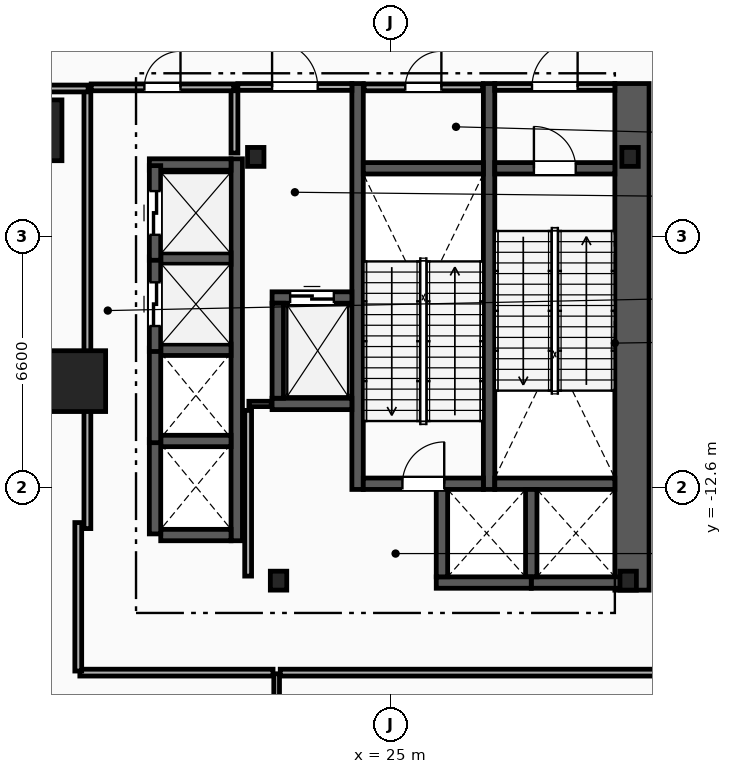
"""IFC4 building model, lengths in metres.
Left out: names, types, materials, properties, quantities, classifications, styles, units other than length and angle.
Written with IfcOpenShell. Run it as: python <this file> out.ifc"""

import sys

from ifc_helpers import new_model, si_unit, direction, frame, frame_2d, origin, origin_2d, place, context, subcontext, project, spatial, rectangle, i_section, extrude, element, fill, save


model = new_model("IFC4")
c1 = context("Model", 3, precision=1e-05, world=origin(), true_north=direction((0.0, 1.0)))
c2 = subcontext(c1, "Body", "Model", "MODEL_VIEW")
j1 = project(units=[si_unit("LENGTHUNIT", "METRE"), si_unit("PLANEANGLEUNIT", "RADIAN")], contexts=[c1])
p1 = place(None, origin())
s1 = spatial("IfcSite", under=j1, at=p1, CompositionType="ELEMENT")
p2 = place(p1, origin())
s2 = spatial("IfcBuilding", under=s1, at=p2, CompositionType="ELEMENT")
p3 = place(p2, frame((0.0, 0.0, 6.0)))
s3 = spatial("IfcBuildingStorey", under=s2, at=p3, CompositionType="ELEMENT", Elevation=6.0)
for number, where, z_axis, x_axis in (
    (1, (31.3, -3.9, 0.0), (0.0, 0.0, 1.0), (1.0, 0.0, 0.0)),
    (2, (21.45, -3.9, 0.0), (0.0, 0.0, 1.0), (1.0, 0.0, 0.0)),
    (3, (22.05, -15.05, 0.0), (0.0, 0.0, 1.0), (1.0, 0.0, 0.0)),
    (4, (31.25, -15.05, 0.0), (0.0, 0.0, 1.0), (1.0, 0.0, 0.0)),
):
    element("IfcColumn", number, at=place(p3, frame(where, z_axis=z_axis, x_axis=x_axis)), inside=s3, PredefinedType="COLUMN", context=c2, shape_type="SweptSolid", body=[
        extrude(i_section(OverallWidth=0.432, OverallDepth=0.498, WebThickness=0.056, FlangeThickness=0.089, FilletRadius=0.018, at=origin_2d()), origin(), (0.0, 0.0, 1.0), 6.0),
    ])
for number, where, z_axis, x_axis in (
    (5, (15.55, -3.2, 0.0), (0.0, 0.0, 1.0), (1.0, 0.0, 0.0)),
    (6, (16.7, -9.8, 0.0), (0.0, 0.0, 1.0), (1.0, 0.0, 0.0)),
):
    element("IfcColumn", number, at=place(p3, frame(where, z_axis=z_axis, x_axis=x_axis)), inside=s3, PredefinedType="COLUMN", context=c2, shape_type="SweptSolid", body=[
        extrude(rectangle(XDim=1.6, YDim=1.6, at=origin_2d()), origin(), (0.0, 0.0, 1.0), 6.0),
    ])
p4 = place(p3, frame((31.35, -15.3, 0.0), z_axis=(0.0, 0.0, 1.0), x_axis=(0.0, 1.0, 0.0)))
e7 = element("IfcWall", 7, at=p4, inside=s3, PredefinedType="SHEAR", context=c2, shape_type="SweptSolid", body=[
    extrude(rectangle(XDim=13.33, YDim=0.9, at=frame_2d((6.665, 0.0))), origin(), (0.0, 0.0, 1.0), 5.65),
])
for number, where, z_axis, x_axis in (
    (8, (27.59, -12.65, 0.0), (0.0, 0.0, 1.0), (0.0, 1.0, 0.0)),
    (9, (24.13, -12.65, 0.0), (0.0, 0.0, 1.0), (0.0, 1.0, 0.0)),
):
    element("IfcWall", number, at=place(p3, frame(where, z_axis=z_axis, x_axis=x_axis)), inside=s3, PredefinedType="SHEAR", context=c2, shape_type="SweptSolid", body=[
        extrude(rectangle(XDim=10.68, YDim=0.3, at=frame_2d((5.34, 0.0))), origin(), (0.0, 0.0, 1.0), 5.65),
    ])
p5 = place(p3, frame((27.74, -4.2, 0.0), z_axis=(0.0, 0.0, 1.0), x_axis=(1.0, 0.0, 0.0)))
e10 = element("IfcWall", 10, at=p5, inside=s3, PredefinedType="SHEAR", context=c2, shape_type="SweptSolid", body=[
    extrude(rectangle(XDim=3.16, YDim=0.3, at=frame_2d((1.58, 0.0))), origin(), (0.0, 0.0, 1.0), 5.65),
])
p6 = place(p5, frame((1.03, 0.0, 0.0)))
e11 = element("IfcOpeningElement", 11, at=p6, cuts=e10, PredefinedType="OPENING", context=c2, shape_type="SweptSolid", body=[
    extrude(rectangle(XDim=1.1, YDim=2.15, at=frame_2d((0.55, 1.075))), frame((0.0, 0.16, 0.0), z_axis=(0.0, -1.0, 0.0), x_axis=(1.0, 0.0, 0.0)), (0.0, 0.0, 1.0), 0.32),
])
p7 = place(p3, frame((27.74, -12.5, 0.0), z_axis=(0.0, 0.0, 1.0), x_axis=(1.0, 0.0, 0.0)))
e12 = element("IfcWall", 12, at=p7, inside=s3, PredefinedType="SHEAR", context=c2, shape_type="SweptSolid", body=[
    extrude(rectangle(XDim=3.16, YDim=0.3, at=frame_2d((1.58, 0.0))), origin(), (0.0, 0.0, 1.0), 5.65),
])
p8 = place(p3, frame((24.28, -12.5, 0.0), z_axis=(0.0, 0.0, 1.0), x_axis=(1.0, 0.0, 0.0)))
e13 = element("IfcWall", 13, at=p8, inside=s3, PredefinedType="SHEAR", context=c2, shape_type="SweptSolid", body=[
    extrude(rectangle(XDim=3.16, YDim=0.3, at=frame_2d((1.58, 0.0))), origin(), (0.0, 0.0, 1.0), 5.65),
])
p9 = place(p8, frame((1.03, 0.0, 0.0)))
e14 = element("IfcOpeningElement", 14, at=p9, cuts=e13, PredefinedType="OPENING", context=c2, shape_type="SweptSolid", body=[
    extrude(rectangle(XDim=1.1, YDim=2.15, at=frame_2d((0.55, 1.075))), frame((0.0, 0.16, 0.0), z_axis=(0.0, -1.0, 0.0), x_axis=(1.0, 0.0, 0.0)), (0.0, 0.0, 1.0), 0.32),
])
p10 = place(p3, frame((24.28, -4.2, 0.0), z_axis=(0.0, 0.0, 1.0), x_axis=(1.0, 0.0, 0.0)))
e15 = element("IfcWall", 15, at=p10, inside=s3, PredefinedType="SHEAR", context=c2, shape_type="SweptSolid", body=[
    extrude(rectangle(XDim=3.16, YDim=0.3, at=frame_2d((1.58, 0.0))), origin(), (0.0, 0.0, 1.0), 5.65),
])
p11 = place(p3, frame((20.89, -3.8, 0.0), z_axis=(0.0, 0.0, 1.0), x_axis=(0.0, 1.0, 0.0)))
e16 = element("IfcWall", 16, at=p11, inside=s3, PredefinedType="PARTITIONING", context=c2, shape_type="SweptSolid", body=[
    extrude(rectangle(XDim=1.65, YDim=0.18, at=frame_2d((0.825, 0.0))), origin(), (0.0, 0.0, 1.0), 5.65),
])
p12 = place(p3, frame((20.98, -2.06, 0.0), z_axis=(0.0, 0.0, 1.0), x_axis=(1.0, 0.0, 0.0)))
e17 = element("IfcWall", 17, at=p12, inside=s3, PredefinedType="PARTITIONING", context=c2, shape_type="SweptSolid", body=[
    extrude(rectangle(XDim=3.0, YDim=0.18, at=frame_2d((1.5, 0.0))), origin(), (0.0, 0.0, 1.0), 5.65),
])
p13 = place(p12, frame((0.9, 0.0, 0.0)))
e18 = element("IfcOpeningElement", 18, at=p13, cuts=e17, PredefinedType="OPENING", context=c2, shape_type="SweptSolid", body=[
    extrude(rectangle(XDim=1.2, YDim=2.15, at=frame_2d((0.6, 1.075))), frame((0.0, 0.1, 0.0), z_axis=(0.0, -1.0, 0.0), x_axis=(1.0, 0.0, 0.0)), (0.0, 0.0, 1.0), 0.2),
])
p14 = place(p3, frame((27.74, -2.06, 0.0), z_axis=(0.0, 0.0, 1.0), x_axis=(1.0, 0.0, 0.0)))
e19 = element("IfcWall", 19, at=p14, inside=s3, PredefinedType="PARTITIONING", context=c2, shape_type="SweptSolid", body=[
    extrude(rectangle(XDim=3.16, YDim=0.18, at=frame_2d((1.58, 0.0))), origin(), (0.0, 0.0, 1.0), 5.65),
])
p15 = place(p14, frame((0.98, 0.0, 0.0)))
e20 = element("IfcOpeningElement", 20, at=p15, cuts=e19, PredefinedType="OPENING", context=c2, shape_type="SweptSolid", body=[
    extrude(rectangle(XDim=1.2, YDim=2.15, at=frame_2d((0.6, 1.075))), frame((0.0, 0.1, 0.0), z_axis=(0.0, -1.0, 0.0), x_axis=(1.0, 0.0, 0.0)), (0.0, 0.0, 1.0), 0.2),
])
p16 = place(p3, frame((21.88, -7.6, 0.0), z_axis=(0.0, 0.0, 1.0), x_axis=(1.0, 0.0, 0.0)))
e21 = element("IfcWall", 21, at=p16, inside=s3, PredefinedType="SHEAR", context=c2, shape_type="SweptSolid", body=[
    extrude(rectangle(XDim=2.1, YDim=0.3, at=frame_2d((1.05, 0.0))), origin(), (0.0, 0.0, 1.0), 5.65),
])
p17 = place(p16, frame((0.475, 0.0, 0.0)))
e22 = element("IfcOpeningElement", 22, at=p17, cuts=e21, PredefinedType="OPENING", context=c2, shape_type="SweptSolid", body=[
    extrude(rectangle(XDim=1.15, YDim=2.2, at=frame_2d((0.575, 1.1))), frame((0.0, 0.16, 0.0), z_axis=(0.0, -1.0, 0.0), x_axis=(1.0, 0.0, 0.0)), (0.0, 0.0, 1.0), 0.32),
])
p18 = place(p3, frame((21.88, -10.4, 0.0), z_axis=(0.0, 0.0, 1.0), x_axis=(1.0, 0.0, 0.0)))
e23 = element("IfcWall", 23, at=p18, inside=s3, PredefinedType="SHEAR", context=c2, shape_type="SweptSolid", body=[
    extrude(rectangle(XDim=2.1, YDim=0.3, at=frame_2d((1.05, 0.0))), origin(), (0.0, 0.0, 1.0), 5.65),
])
for number, where, z_axis, x_axis in (
    (24, (22.03, -10.25, 0.0), (0.0, 0.0, 1.0), (0.0, 1.0, 0.0)),
    (25, (28.7, -15.1, 0.0), (0.0, 0.0, 1.0), (1.0, 0.0, 0.0)),
):
    element("IfcWall", number, at=place(p3, frame(where, z_axis=z_axis, x_axis=x_axis)), inside=s3, PredefinedType="SHEAR", context=c2, shape_type="SweptSolid", body=[
        extrude(rectangle(XDim=2.5, YDim=0.3, at=frame_2d((1.25, 0.0))), origin(), (0.0, 0.0, 1.0), 5.65),
    ])
p19 = place(p3, frame((28.7, -14.95, 0.0), z_axis=(0.0, 0.0, 1.0), x_axis=(0.0, 1.0, 0.0)))
e26 = element("IfcWall", 26, at=p19, inside=s3, PredefinedType="SHEAR", context=c2, shape_type="SweptSolid", body=[
    extrude(rectangle(XDim=2.3, YDim=0.3, at=frame_2d((1.15, 0.0))), origin(), (0.0, 0.0, 1.0), 5.65),
])
p20 = place(p3, frame((26.2, -15.1, 0.0), z_axis=(0.0, 0.0, 1.0), x_axis=(1.0, 0.0, 0.0)))
e27 = element("IfcWall", 27, at=p20, inside=s3, PredefinedType="SHEAR", context=c2, shape_type="SweptSolid", body=[
    extrude(rectangle(XDim=2.5, YDim=0.3, at=frame_2d((1.25, 0.0))), origin(), (0.0, 0.0, 1.0), 5.65),
])
p21 = place(p3, frame((26.35, -14.95, 0.0), z_axis=(0.0, 0.0, 1.0), x_axis=(0.0, 1.0, 0.0)))
e28 = element("IfcWall", 28, at=p21, inside=s3, PredefinedType="SHEAR", context=c2, shape_type="SweptSolid", body=[
    extrude(rectangle(XDim=2.3, YDim=0.3, at=frame_2d((1.15, 0.0))), origin(), (0.0, 0.0, 1.0), 5.65),
])
p22 = place(p3, frame((20.95, -14.0, 0.0), z_axis=(0.0, 0.0, 1.0), x_axis=(0.0, 1.0, 0.0)))
e29 = element("IfcWall", 29, at=p22, inside=s3, PredefinedType="SHEAR", context=c2, shape_type="SweptSolid", body=[
    extrude(rectangle(XDim=10.05, YDim=0.3, at=frame_2d((5.025, 0.0))), origin(), (0.0, 0.0, 1.0), 5.65),
])
p23 = place(p3, frame((18.95, -13.85, 0.0), z_axis=(0.0, 0.0, 1.0), x_axis=(1.0, 0.0, 0.0)))
e30 = element("IfcWall", 30, at=p23, inside=s3, PredefinedType="SHEAR", context=c2, shape_type="SweptSolid", body=[
    extrude(rectangle(XDim=1.85, YDim=0.3, at=frame_2d((0.925, 0.0))), origin(), (0.0, 0.0, 1.0), 5.65),
])
p24 = place(p3, frame((18.65, -4.1, 0.0), z_axis=(0.0, 0.0, 1.0), x_axis=(1.0, 0.0, 0.0)))
e31 = element("IfcWall", 31, at=p24, inside=s3, PredefinedType="SHEAR", context=c2, shape_type="SweptSolid", body=[
    extrude(rectangle(XDim=2.15, YDim=0.3, at=frame_2d((1.075, 0.0))), origin(), (0.0, 0.0, 1.0), 5.65),
])
for number, where, z_axis, x_axis in (
    (32, (18.95, -11.375, 0.0), (0.0, 0.0, 1.0), (1.0, 0.0, 0.0)),
    (33, (18.95, -8.975, 0.0), (0.0, 0.0, 1.0), (1.0, 0.0, 0.0)),
    (34, (18.95, -6.575, 0.0), (0.0, 0.0, 1.0), (1.0, 0.0, 0.0)),
):
    element("IfcWall", number, at=place(p3, frame(where, z_axis=z_axis, x_axis=x_axis)), inside=s3, PredefinedType="SHEAR", context=c2, shape_type="SweptSolid", body=[
        extrude(rectangle(XDim=1.85, YDim=0.3, at=frame_2d((0.925, 0.0))), origin(), (0.0, 0.0, 1.0), 5.65),
    ])
for number, where, z_axis, x_axis in (
    (35, (18.8, -13.82, 0.0), (0.0, 0.0, 1.0), (0.0, 1.0, 0.0)),
    (36, (18.8, -11.42, 0.0), (0.0, 0.0, 1.0), (0.0, 1.0, 0.0)),
):
    element("IfcWall", number, at=place(p3, frame(where, z_axis=z_axis, x_axis=x_axis)), inside=s3, PredefinedType="SHEAR", context=c2, shape_type="SweptSolid", body=[
        extrude(rectangle(XDim=2.49, YDim=0.3, at=frame_2d((1.245, 0.0))), origin(), (0.0, 0.0, 1.0), 5.65),
    ])
p25 = place(p3, frame((18.8, -9.02, 0.0), z_axis=(0.0, 0.0, 1.0), x_axis=(0.0, 1.0, 0.0)))
e37 = element("IfcWall", 37, at=p25, inside=s3, PredefinedType="SHEAR", context=c2, shape_type="SweptSolid", body=[
    extrude(rectangle(XDim=2.49, YDim=0.3, at=frame_2d((1.245, 0.0))), origin(), (0.0, 0.0, 1.0), 5.65),
])
p26 = place(p25, frame((0.67, 0.0, 0.0)))
e38 = element("IfcOpeningElement", 38, at=p26, cuts=e37, PredefinedType="OPENING", context=c2, shape_type="SweptSolid", body=[
    extrude(rectangle(XDim=1.15, YDim=2.2, at=frame_2d((0.575, 1.1))), frame((0.0, 0.16, 0.0), z_axis=(0.0, -1.0, 0.0), x_axis=(1.0, 0.0, 0.0)), (0.0, 0.0, 1.0), 0.32),
])
p27 = place(p3, frame((18.8, -6.62, 0.0), z_axis=(0.0, 0.0, 1.0), x_axis=(0.0, 1.0, 0.0)))
e39 = element("IfcWall", 39, at=p27, inside=s3, PredefinedType="SHEAR", context=c2, shape_type="SweptSolid", body=[
    extrude(rectangle(XDim=2.49, YDim=0.3, at=frame_2d((1.245, 0.0))), origin(), (0.0, 0.0, 1.0), 5.65),
])
p28 = place(p27, frame((0.67, 0.0, 0.0)))
e40 = element("IfcOpeningElement", 40, at=p28, cuts=e39, PredefinedType="OPENING", context=c2, shape_type="SweptSolid", body=[
    extrude(rectangle(XDim=1.15, YDim=2.2, at=frame_2d((0.575, 1.1))), frame((0.0, 0.16, 0.0), z_axis=(0.0, -1.0, 0.0), x_axis=(1.0, 0.0, 0.0)), (0.0, 0.0, 1.0), 0.32),
])
p29 = place(p3, frame((17.02, -13.68, 0.0), z_axis=(0.0, 0.0, 1.0), x_axis=(0.0, 1.0, 0.0)))
e41 = element("IfcWall", 41, at=p29, inside=s3, PredefinedType="PARTITIONING", context=c2, shape_type="SweptSolid", body=[
    extrude(rectangle(XDim=11.51, YDim=0.18, at=frame_2d((5.755, 0.0))), origin(), (0.0, 0.0, 1.0), 5.65),
])
p30 = place(p3, frame((17.12, -2.07, 0.0), z_axis=(0.0, 0.0, 1.0), x_axis=(1.0, 0.0, 0.0)))
e42 = element("IfcWall", 42, at=p30, inside=s3, PredefinedType="PARTITIONING", context=c2, shape_type="SweptSolid", body=[
    extrude(rectangle(XDim=3.75, YDim=0.18, at=frame_2d((1.875, 0.0))), origin(), (0.0, 0.0, 1.0), 5.65),
])
p31 = place(p30, frame((1.4, 0.0, 0.0)))
e43 = element("IfcOpeningElement", 43, at=p31, cuts=e42, PredefinedType="OPENING", context=c2, shape_type="SweptSolid", body=[
    extrude(rectangle(XDim=0.95, YDim=2.1, at=frame_2d((0.475, 1.05))), frame((0.0, 0.1, 0.0), z_axis=(0.0, -1.0, 0.0), x_axis=(1.0, 0.0, 0.0)), (0.0, 0.0, 1.0), 0.2),
])
p32 = place(p3, frame((21.27, -10.4, 0.0), z_axis=(0.0, 0.0, 1.0), x_axis=(1.0, 0.0, 0.0)))
e44 = element("IfcWall", 44, at=p32, inside=s3, PredefinedType="PARTITIONING", context=c2, shape_type="SweptSolid", body=[
    extrude(rectangle(XDim=0.59, YDim=0.14, at=frame_2d((0.295, 0.0))), origin(), (0.0, 0.0, 1.0), 5.65),
])
p33 = place(p3, frame((21.25, -14.93, 0.0), z_axis=(0.0, 0.0, 1.0), x_axis=(0.0, 1.0, 0.0)))
e45 = element("IfcWall", 45, at=p33, inside=s3, PredefinedType="PARTITIONING", context=c2, shape_type="SweptSolid", body=[
    extrude(rectangle(XDim=4.36, YDim=0.18, at=frame_2d((2.18, 0.0))), origin(), (0.0, 0.0, 1.0), 5.65),
])
p34 = place(p3, frame((24.3, -2.07, 0.0), z_axis=(0.0, 0.0, 1.0), x_axis=(1.0, 0.0, 0.0)))
e46 = element("IfcWall", 46, at=p34, inside=s3, PredefinedType="PARTITIONING", context=c2, shape_type="SweptSolid", body=[
    extrude(rectangle(XDim=3.12, YDim=0.18, at=frame_2d((1.56, 0.0))), origin(), (0.0, 0.0, 1.0), 5.65),
])
p35 = place(p34, frame((1.085, 0.0, 0.0)))
e47 = element("IfcOpeningElement", 47, at=p35, cuts=e46, PredefinedType="OPENING", context=c2, shape_type="SweptSolid", body=[
    extrude(rectangle(XDim=0.95, YDim=2.1, at=frame_2d((0.475, 1.05))), frame((0.0, 0.1, 0.0), z_axis=(0.0, -1.0, 0.0), x_axis=(1.0, 0.0, 0.0)), (0.0, 0.0, 1.0), 0.2),
])
p36 = place(p3, frame((22.0, -27.88, 0.0), z_axis=(0.0, 0.0, 1.0), x_axis=(0.0, 1.0, 0.0)))
e48 = element("IfcWall", 48, at=p36, inside=s3, PredefinedType="PARTITIONING", context=c2, shape_type="SweptSolid", body=[
    extrude(rectangle(XDim=10.38, YDim=0.15, at=frame_2d((5.19, 0.0))), origin(), (0.0, 0.0, 1.0), 5.65),
])
p37 = place(p36, frame((4.49, 0.0, 1.05)))
e49 = element("IfcOpeningElement", 49, at=p37, cuts=e48, PredefinedType="OPENING", context=c2, shape_type="SweptSolid", body=[
    extrude(rectangle(XDim=1.4, YDim=1.5, at=frame_2d((0.7, 0.75))), frame((0.0, 0.085, 0.0), z_axis=(0.0, -1.0, 0.0), x_axis=(1.0, 0.0, 0.0)), (0.0, 0.0, 1.0), 0.17),
])
p38 = place(p3, frame((10.3, -2.1, 0.0), z_axis=(0.0, 0.0, 1.0), x_axis=(1.0, 0.0, 0.0)))
e50 = element("IfcWall", 50, at=p38, inside=s3, PredefinedType="PARTITIONING", context=c2, shape_type="SweptSolid", body=[
    extrude(rectangle(XDim=6.74, YDim=0.18, at=frame_2d((3.37, 0.0))), origin(), (0.0, 0.0, 1.0), 4.877),
])
p39 = place(p3, frame((16.822, -17.47, 0.0), z_axis=(0.0, 0.0, 1.0), x_axis=(1.0, 0.0, 0.0)))
e51 = element("IfcWall", 51, at=p39, inside=s3, PredefinedType="PARTITIONING", context=c2, shape_type="SweptSolid", body=[
    extrude(rectangle(XDim=5.083, YDim=0.18, at=frame_2d((2.542, 0.0))), origin(), (0.0, 0.0, 1.0), 5.65),
])
p40 = place(p3, frame((16.78, -13.521, 0.0), z_axis=(0.0, 0.0, 1.0), x_axis=(0.0, -1.0, 0.0)))
e52 = element("IfcWall", 52, at=p40, inside=s3, PredefinedType="PARTITIONING", context=c2, shape_type="SweptSolid", body=[
    extrude(rectangle(XDim=3.907, YDim=0.18, at=frame_2d((1.954, 0.0))), origin(), (0.0, 0.0, 1.0), 5.65),
])
p41 = place(p3, frame((22.095, -17.47, 0.0), z_axis=(0.0, 0.0, 1.0), x_axis=(1.0, 0.0, 0.0)))
e53 = element("IfcWall", 53, at=p41, inside=s3, PredefinedType="PARTITIONING", context=c2, shape_type="SweptSolid", body=[
    extrude(rectangle(XDim=11.533, YDim=0.18, at=frame_2d((5.767, 0.0))), origin(), (0.0, 0.0, 1.0), 4.877),
])
p42 = place(p6, origin())
e54 = element("IfcDoor", 54, at=p42, inside=s3, OperationType="SINGLE_SWING_LEFT", PredefinedType="DOOR", context=c2, shape_type="SweptSolid", body=[
    extrude(rectangle(XDim=1.1, YDim=2.15, at=frame_2d((0.55, 1.075))), frame((0.0, 0.025, 0.0), z_axis=(0.0, -1.0, 0.0), x_axis=(1.0, 0.0, 0.0)), (0.0, 0.0, 1.0), 0.05),
])
fill(e11, e54)
p43 = place(p9, origin())
e55 = element("IfcDoor", 55, at=p43, inside=s3, OperationType="SINGLE_SWING_RIGHT", PredefinedType="DOOR", context=c2, shape_type="SweptSolid", body=[
    extrude(rectangle(XDim=1.1, YDim=2.15, at=frame_2d((0.55, 1.075))), frame((0.0, 0.025, 0.0), z_axis=(0.0, -1.0, 0.0), x_axis=(1.0, 0.0, 0.0)), (0.0, 0.0, 1.0), 0.05),
])
fill(e14, e55)
p44 = place(p13, origin())
e56 = element("IfcDoor", 56, at=p44, inside=s3, OperationType="SINGLE_SWING_LEFT", PredefinedType="DOOR", context=c2, shape_type="SweptSolid", body=[
    extrude(rectangle(XDim=1.2, YDim=2.15, at=frame_2d((0.6, 1.075))), frame((0.0, 0.025, 0.0), z_axis=(0.0, -1.0, 0.0), x_axis=(1.0, 0.0, 0.0)), (0.0, 0.0, 1.0), 0.05),
])
fill(e18, e56)
p45 = place(p15, origin())
e57 = element("IfcDoor", 57, at=p45, inside=s3, OperationType="SINGLE_SWING_RIGHT", PredefinedType="DOOR", context=c2, shape_type="SweptSolid", body=[
    extrude(rectangle(XDim=1.2, YDim=2.15, at=frame_2d((0.6, 1.075))), frame((0.0, 0.025, 0.0), z_axis=(0.0, -1.0, 0.0), x_axis=(1.0, 0.0, 0.0)), (0.0, 0.0, 1.0), 0.05),
])
fill(e20, e57)
p46 = place(p17, origin())
e58 = element("IfcDoor", 58, at=p46, inside=s3, OperationType="SLIDING_TO_LEFT", PredefinedType="TRAPDOOR", context=c2, shape_type="SweptSolid", body=[
    extrude(rectangle(XDim=1.15, YDim=2.2, at=frame_2d((0.575, 1.1))), frame((0.0, 0.025, 0.0), z_axis=(0.0, -1.0, 0.0), x_axis=(1.0, 0.0, 0.0)), (0.0, 0.0, 1.0), 0.05),
])
fill(e22, e58)
p47 = place(p26, origin())
e59 = element("IfcDoor", 59, at=p47, inside=s3, OperationType="SLIDING_TO_LEFT", PredefinedType="TRAPDOOR", context=c2, shape_type="SweptSolid", body=[
    extrude(rectangle(XDim=1.15, YDim=2.2, at=frame_2d((0.575, 1.1))), frame((0.0, 0.025, 0.0), z_axis=(0.0, -1.0, 0.0), x_axis=(1.0, 0.0, 0.0)), (0.0, 0.0, 1.0), 0.05),
])
fill(e38, e59)
p48 = place(p28, origin())
e60 = element("IfcDoor", 60, at=p48, inside=s3, OperationType="SLIDING_TO_LEFT", PredefinedType="TRAPDOOR", context=c2, shape_type="SweptSolid", body=[
    extrude(rectangle(XDim=1.15, YDim=2.2, at=frame_2d((0.575, 1.1))), frame((0.0, 0.025, 0.0), z_axis=(0.0, -1.0, 0.0), x_axis=(1.0, 0.0, 0.0)), (0.0, 0.0, 1.0), 0.05),
])
fill(e40, e60)
p49 = place(p31, origin())
e61 = element("IfcDoor", 61, at=p49, inside=s3, OperationType="SINGLE_SWING_RIGHT", PredefinedType="DOOR", context=c2, shape_type="SweptSolid", body=[
    extrude(rectangle(XDim=0.95, YDim=2.1, at=frame_2d((0.475, 1.05))), frame((0.0, 0.025, 0.0), z_axis=(0.0, -1.0, 0.0), x_axis=(1.0, 0.0, 0.0)), (0.0, 0.0, 1.0), 0.05),
])
fill(e43, e61)
p50 = place(p35, origin())
e62 = element("IfcDoor", 62, at=p50, inside=s3, OperationType="SINGLE_SWING_RIGHT", PredefinedType="DOOR", context=c2, shape_type="SweptSolid", body=[
    extrude(rectangle(XDim=0.95, YDim=2.1, at=frame_2d((0.475, 1.05))), frame((0.0, 0.025, 0.0), z_axis=(0.0, -1.0, 0.0), x_axis=(1.0, 0.0, 0.0)), (0.0, 0.0, 1.0), 0.05),
])
fill(e47, e62)
save(model, sys.argv[1])
